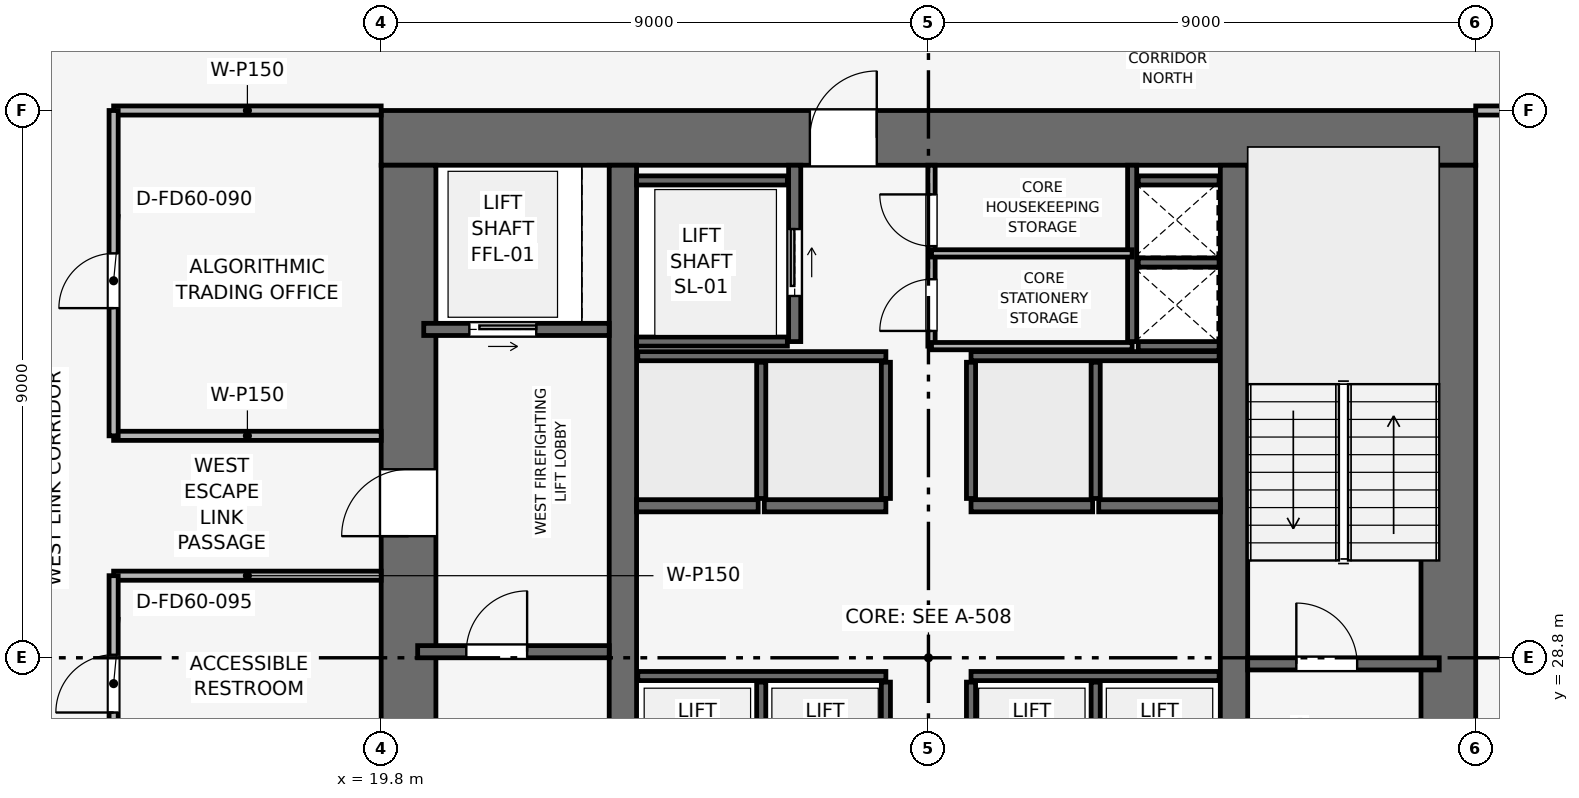
"""IFC4 building model, lengths in metres.
Left out: names, types, materials, properties, quantities, classifications, styles, units other than length and angle.
Written with IfcOpenShell. Run it as: python <this file> out.ifc"""

import sys

from ifc_helpers import new_model, si_unit, direction, frame, frame_2d, origin, place, context, subcontext, project, spatial, rectangle, extrude, element, fill, save


model = new_model("IFC4")
c1 = context("Model", 3, precision=1e-05, world=origin(), true_north=direction((0.0, 1.0)))
c2 = subcontext(c1, "Body", "Model", "MODEL_VIEW")
j1 = project(units=[si_unit("LENGTHUNIT", "METRE"), si_unit("PLANEANGLEUNIT", "RADIAN")], contexts=[c1])
p1 = place(None, origin())
s1 = spatial("IfcSite", under=j1, at=p1, CompositionType="ELEMENT")
p2 = place(p1, origin())
s2 = spatial("IfcBuilding", under=s1, at=p2, CompositionType="ELEMENT")
p3 = place(p2, frame((0.0, 0.0, 175.8)))
s3 = spatial("IfcBuildingStorey", under=s2, at=p3, CompositionType="ELEMENT", Elevation=175.8)
p4 = place(p3, frame((19.8, 37.35, 0.0), z_axis=(0.0, 0.0, 1.0), x_axis=(1.0, 0.0, 0.0)))
e1 = element("IfcWall", 1, at=p4, inside=s3, PredefinedType="SHEAR", context=c2, shape_type="SweptSolid", body=[
    extrude(rectangle(XDim=18.0, YDim=0.9, at=frame_2d((9.0, 0.0))), origin(), (0.0, 0.0, 1.0), 3.75),
])
p5 = place(p4, frame((7.05, 0.0, 0.0)))
e2 = element("IfcOpeningElement", 2, at=p5, cuts=e1, PredefinedType="OPENING", context=c2, shape_type="SweptSolid", body=[
    extrude(rectangle(XDim=1.1, YDim=2.15, at=frame_2d((0.55, 1.075))), frame((0.0, 0.46, 0.0), z_axis=(0.0, -1.0, 0.0), x_axis=(1.0, 0.0, 0.0)), (0.0, 0.0, 1.0), 0.92),
])
p6 = place(p3, frame((20.25, 20.7, 0.0), z_axis=(0.0, 0.0, 1.0), x_axis=(0.0, 1.0, 0.0)))
e3 = element("IfcWall", 3, at=p6, inside=s3, PredefinedType="SHEAR", context=c2, shape_type="SweptSolid", body=[
    extrude(rectangle(XDim=16.2, YDim=0.9, at=frame_2d((8.1, 0.0))), origin(), (0.0, 0.0, 1.0), 3.75),
])
p7 = place(p6, frame((10.1, 0.0, 0.0)))
e4 = element("IfcOpeningElement", 4, at=p7, cuts=e3, PredefinedType="OPENING", context=c2, shape_type="SweptSolid", body=[
    extrude(rectangle(XDim=1.1, YDim=2.15, at=frame_2d((0.55, 1.075))), frame((0.0, 0.46, 0.0), z_axis=(0.0, -1.0, 0.0), x_axis=(1.0, 0.0, 0.0)), (0.0, 0.0, 1.0), 0.92),
])
p8 = place(p3, frame((37.35, 20.7, 0.0), z_axis=(0.0, 0.0, 1.0), x_axis=(0.0, 1.0, 0.0)))
e5 = element("IfcWall", 5, at=p8, inside=s3, PredefinedType="SHEAR", context=c2, shape_type="SweptSolid", body=[
    extrude(rectangle(XDim=16.2, YDim=0.9, at=frame_2d((8.1, 0.0))), origin(), (0.0, 0.0, 1.0), 3.75),
])
p9 = place(p8, frame((4.6, 0.0, 0.0)))
e6 = element("IfcOpeningElement", 6, at=p9, cuts=e5, PredefinedType="OPENING", context=c2, shape_type="SweptSolid", body=[
    extrude(rectangle(XDim=1.1, YDim=2.15, at=frame_2d((0.55, 1.075))), frame((0.0, 0.46, 0.0), z_axis=(0.0, -1.0, 0.0), x_axis=(1.0, 0.0, 0.0)), (0.0, 0.0, 1.0), 0.92),
])
for number, where, z_axis, x_axis in (
    (7, (23.775, 20.7, 0.0), (0.0, 0.0, 1.0), (0.0, 1.0, 0.0)),
    (8, (33.825, 20.7, 0.0), (0.0, 0.0, 1.0), (0.0, 1.0, 0.0)),
):
    element("IfcWall", number, at=place(p3, frame(where, z_axis=z_axis, x_axis=x_axis)), inside=s3, PredefinedType="SHEAR", context=c2, shape_type="SweptSolid", body=[
        extrude(rectangle(XDim=16.2, YDim=0.45, at=frame_2d((8.1, 0.0))), origin(), (0.0, 0.0, 1.0), 3.75),
    ])
p10 = place(p3, frame((20.4, 28.9, 0.0), z_axis=(0.0, 0.0, 1.0), x_axis=(1.0, 0.0, 0.0)))
e9 = element("IfcWall", 9, at=p10, inside=s3, PredefinedType="SHEAR", context=c2, shape_type="SweptSolid", body=[
    extrude(rectangle(XDim=3.15, YDim=0.2, at=frame_2d((1.575, 0.0))), origin(), (0.0, 0.0, 1.0), 3.495),
])
p11 = place(p10, frame((0.8, 0.0, 0.0)))
e10 = element("IfcOpeningElement", 10, at=p11, cuts=e9, PredefinedType="OPENING", context=c2, shape_type="SweptSolid", body=[
    extrude(rectangle(XDim=1.0, YDim=2.1, at=frame_2d((0.5, 1.05))), frame((0.0, 0.11, 0.0), z_axis=(0.0, -1.0, 0.0), x_axis=(1.0, 0.0, 0.0)), (0.0, 0.0, 1.0), 0.22),
])
p12 = place(p3, frame((34.05, 28.7, 0.0), z_axis=(0.0, 0.0, 1.0), x_axis=(1.0, 0.0, 0.0)))
e11 = element("IfcWall", 11, at=p12, inside=s3, PredefinedType="SHEAR", context=c2, shape_type="SweptSolid", body=[
    extrude(rectangle(XDim=3.15, YDim=0.2, at=frame_2d((1.575, 0.0))), origin(), (0.0, 0.0, 1.0), 3.495),
])
p13 = place(p12, frame((0.8, 0.0, 0.0)))
e12 = element("IfcOpeningElement", 12, at=p13, cuts=e11, PredefinedType="OPENING", context=c2, shape_type="SweptSolid", body=[
    extrude(rectangle(XDim=1.0, YDim=2.1, at=frame_2d((0.5, 1.05))), frame((0.0, 0.11, 0.0), z_axis=(0.0, -1.0, 0.0), x_axis=(1.0, 0.0, 0.0)), (0.0, 0.0, 1.0), 0.22),
])
p14 = place(p3, frame((32.15, 34.0, 0.0), z_axis=(0.0, 0.0, 1.0), x_axis=(0.0, 1.0, 0.0)))
e13 = element("IfcWall", 13, at=p14, inside=s3, PredefinedType="SHEAR", context=c2, shape_type="SweptSolid", body=[
    extrude(rectangle(XDim=2.9, YDim=0.15, at=frame_2d((1.45, 0.0))), origin(), (0.0, 0.0, 1.0), 3.495),
])
for number, where, z_axis, x_axis in (
    (14, (32.25, 33.925, 0.0), (0.0, 0.0, 1.0), (1.0, 0.0, 0.0)),
    (15, (32.25, 35.3, 0.0), (0.0, 0.0, 1.0), (1.0, 0.0, 0.0)),
):
    element("IfcWall", number, at=place(p3, frame(where, z_axis=z_axis, x_axis=x_axis)), inside=s3, PredefinedType="SHEAR", context=c2, shape_type="SweptSolid", body=[
        extrude(rectangle(XDim=1.33, YDim=0.15, at=frame_2d((0.665, 0.0))), origin(), (0.0, 0.0, 1.0), 3.495),
    ])
p15 = place(p3, frame((20.5, 34.2, 0.0), z_axis=(0.0, 0.0, 1.0), x_axis=(1.0, 0.0, 0.0)))
e16 = element("IfcWall", 16, at=p15, inside=s3, PredefinedType="SHEAR", context=c2, shape_type="SweptSolid", body=[
    extrude(rectangle(XDim=3.05, YDim=0.2, at=frame_2d((1.525, 0.0))), origin(), (0.0, 0.0, 1.0), 3.495),
])
p16 = place(p15, frame((0.75, 0.0, 0.0)))
e17 = element("IfcOpeningElement", 17, at=p16, cuts=e16, PredefinedType="OPENING", context=c2, shape_type="SweptSolid", body=[
    extrude(rectangle(XDim=1.1, YDim=2.15, at=frame_2d((0.55, 1.075))), frame((0.0, 0.11, 0.0), z_axis=(0.0, -1.0, 0.0), x_axis=(1.0, 0.0, 0.0)), (0.0, 0.0, 1.0), 0.22),
])
p17 = place(p3, frame((26.6, 34.0, 0.0), z_axis=(0.0, 0.0, 1.0), x_axis=(0.0, 1.0, 0.0)))
e18 = element("IfcWall", 18, at=p17, inside=s3, PredefinedType="SHEAR", context=c2, shape_type="SweptSolid", body=[
    extrude(rectangle(XDim=2.9, YDim=0.2, at=frame_2d((1.45, 0.0))), origin(), (0.0, 0.0, 1.0), 3.495),
])
p18 = place(p17, frame((0.75, 0.0, 0.0)))
e19 = element("IfcOpeningElement", 19, at=p18, cuts=e18, PredefinedType="OPENING", context=c2, shape_type="SweptSolid", body=[
    extrude(rectangle(XDim=1.1, YDim=2.15, at=frame_2d((0.55, 1.075))), frame((0.0, 0.11, 0.0), z_axis=(0.0, -1.0, 0.0), x_axis=(1.0, 0.0, 0.0)), (0.0, 0.0, 1.0), 0.22),
])
for number, where, z_axis, x_axis in (
    (20, (24.0, 34.0, 0.0), (0.0, 0.0, 1.0), (1.0, 0.0, 0.0)),
    (21, (24.0, 36.65, 0.0), (0.0, 0.0, 1.0), (1.0, 0.0, 0.0)),
):
    element("IfcWall", number, at=place(p3, frame(where, z_axis=z_axis, x_axis=x_axis)), inside=s3, PredefinedType="SHEAR", context=c2, shape_type="SweptSolid", body=[
        extrude(rectangle(XDim=2.48, YDim=0.15, at=frame_2d((1.24, 0.0))), origin(), (0.0, 0.0, 1.0), 3.495),
    ])
for number, where, z_axis, x_axis in (
    (22, (24.0, 31.3, 0.0), (0.0, 0.0, 1.0), (1.0, 0.0, 0.0)),
    (23, (26.1, 31.3, 0.0), (0.0, 0.0, 1.0), (1.0, 0.0, 0.0)),
    (24, (29.5, 31.3, 0.0), (0.0, 0.0, 1.0), (1.0, 0.0, 0.0)),
    (25, (31.6, 31.3, 0.0), (0.0, 0.0, 1.0), (1.0, 0.0, 0.0)),
):
    element("IfcWall", number, at=place(p3, frame(where, z_axis=z_axis, x_axis=x_axis)), inside=s3, PredefinedType="SHEAR", context=c2, shape_type="SweptSolid", body=[
        extrude(rectangle(XDim=2.0, YDim=0.2, at=frame_2d((1.0, 0.0))), origin(), (0.0, 0.0, 1.0), 3.495),
    ])
p19 = place(p3, frame((32.25, 36.65, 0.0), z_axis=(0.0, 0.0, 1.0), x_axis=(1.0, 0.0, 0.0)))
e26 = element("IfcWall", 26, at=p19, inside=s3, PredefinedType="SHEAR", context=c2, shape_type="SweptSolid", body=[
    extrude(rectangle(XDim=1.33, YDim=0.15, at=frame_2d((0.665, 0.0))), origin(), (0.0, 0.0, 1.0), 3.495),
])
for number, where, z_axis, x_axis in (
    (27, (24.02, 28.5, 0.0), (0.0, 0.0, 1.0), (1.0, 0.0, 0.0)),
    (28, (29.5, 28.5, 0.0), (0.0, 0.0, 1.0), (1.0, 0.0, 0.0)),
):
    element("IfcWall", number, at=place(p3, frame(where, z_axis=z_axis, x_axis=x_axis)), inside=s3, PredefinedType="SHEAR", context=c2, shape_type="SweptSolid", body=[
        extrude(rectangle(XDim=4.08, YDim=0.15, at=frame_2d((2.04, 0.0))), origin(), (0.0, 0.0, 1.0), 3.495),
    ])
for number, where, z_axis, x_axis in (
    (29, (26.05, 26.12, 0.0), (0.0, 0.0, 1.0), (0.0, 1.0, 0.0)),
    (30, (28.1, 26.12, 0.0), (0.0, 0.0, 1.0), (0.0, 1.0, 0.0)),
    (31, (29.5, 26.12, 0.0), (0.0, 0.0, 1.0), (0.0, 1.0, 0.0)),
    (32, (31.55, 26.12, 0.0), (0.0, 0.0, 1.0), (0.0, 1.0, 0.0)),
):
    element("IfcWall", number, at=place(p3, frame(where, z_axis=z_axis, x_axis=x_axis)), inside=s3, PredefinedType="SHEAR", context=c2, shape_type="SweptSolid", body=[
        extrude(rectangle(XDim=2.28, YDim=0.15, at=frame_2d((1.14, 0.0))), origin(), (0.0, 0.0, 1.0), 3.495),
    ])
for number, where, z_axis, x_axis in (
    (33, (24.02, 33.76, 0.0), (0.0, 0.0, 1.0), (1.0, 0.0, 0.0)),
    (34, (29.5, 33.76, 0.0), (0.0, 0.0, 1.0), (1.0, 0.0, 0.0)),
):
    element("IfcWall", number, at=place(p3, frame(where, z_axis=z_axis, x_axis=x_axis)), inside=s3, PredefinedType="SHEAR", context=c2, shape_type="SweptSolid", body=[
        extrude(rectangle(XDim=4.08, YDim=0.15, at=frame_2d((2.04, 0.0))), origin(), (0.0, 0.0, 1.0), 3.495),
    ])
for number, where, z_axis, x_axis in (
    (35, (26.05, 31.42, 0.0), (0.0, 0.0, 1.0), (0.0, 1.0, 0.0)),
    (36, (28.1, 31.42, 0.0), (0.0, 0.0, 1.0), (0.0, 1.0, 0.0)),
    (37, (29.5, 31.42, 0.0), (0.0, 0.0, 1.0), (0.0, 1.0, 0.0)),
    (38, (31.55, 31.42, 0.0), (0.0, 0.0, 1.0), (0.0, 1.0, 0.0)),
):
    element("IfcWall", number, at=place(p3, frame(where, z_axis=z_axis, x_axis=x_axis)), inside=s3, PredefinedType="SHEAR", context=c2, shape_type="SweptSolid", body=[
        extrude(rectangle(XDim=2.24, YDim=0.15, at=frame_2d((1.12, 0.0))), origin(), (0.0, 0.0, 1.0), 3.495),
    ])
p20 = place(p3, frame((28.85, 33.925, 0.0), z_axis=(0.0, 0.0, 1.0), x_axis=(0.0, 1.0, 0.0)))
e39 = element("IfcWall", 39, at=p20, inside=s3, PredefinedType="PARTITIONING", context=c2, shape_type="SweptSolid", body=[
    extrude(rectangle(XDim=2.975, YDim=0.12, at=frame_2d((1.487, 0.0))), origin(), (0.0, 0.0, 1.0), 3.495),
])
p21 = place(p20, frame((0.25, 0.0, 0.0)))
e40 = element("IfcOpeningElement", 40, at=p21, cuts=e39, PredefinedType="OPENING", context=c2, shape_type="SweptSolid", body=[
    extrude(rectangle(XDim=0.85, YDim=2.1, at=frame_2d((0.425, 1.05))), frame((0.0, 0.07, 0.0), z_axis=(0.0, -1.0, 0.0), x_axis=(1.0, 0.0, 0.0)), (0.0, 0.0, 1.0), 0.14),
])
p22 = place(p20, frame((1.645, 0.0, 0.0)))
e41 = element("IfcOpeningElement", 41, at=p22, cuts=e39, PredefinedType="OPENING", context=c2, shape_type="SweptSolid", body=[
    extrude(rectangle(XDim=0.85, YDim=2.1, at=frame_2d((0.425, 1.05))), frame((0.0, 0.07, 0.0), z_axis=(0.0, -1.0, 0.0), x_axis=(1.0, 0.0, 0.0)), (0.0, 0.0, 1.0), 0.14),
])
for number, where, z_axis, x_axis in (
    (42, (28.85, 35.45, 0.0), (0.0, 0.0, 1.0), (1.0, 0.0, 0.0)),
    (43, (28.85, 33.925, 0.0), (0.0, 0.0, 1.0), (1.0, 0.0, 0.0)),
):
    element("IfcWall", number, at=place(p3, frame(where, z_axis=z_axis, x_axis=x_axis)), inside=s3, PredefinedType="PARTITIONING", context=c2, shape_type="SweptSolid", body=[
        extrude(rectangle(XDim=3.3, YDim=0.12, at=frame_2d((1.65, 0.0))), origin(), (0.0, 0.0, 1.0), 3.495),
    ])
for number, where, z_axis, x_axis in (
    (44, (15.4, 30.15, 0.0), (0.0, 0.0, 1.0), (1.0, 0.0, 0.0)),
    (45, (15.4, 32.45, 0.0), (0.0, 0.0, 1.0), (1.0, 0.0, 0.0)),
):
    element("IfcWall", number, at=place(p3, frame(where, z_axis=z_axis, x_axis=x_axis)), inside=s3, PredefinedType="PARTITIONING", context=c2, shape_type="SweptSolid", body=[
        extrude(rectangle(XDim=4.4, YDim=0.15, at=frame_2d((2.2, 0.0))), origin(), (0.0, 0.0, 1.0), 3.495),
    ])
p23 = place(p3, frame((15.4, 37.8, 0.0), z_axis=(0.0, 0.0, 1.0), x_axis=(1.0, 0.0, 0.0)))
e46 = element("IfcWall", 46, at=p23, inside=s3, PredefinedType="PARTITIONING", context=c2, shape_type="SweptSolid", body=[
    extrude(rectangle(XDim=4.4, YDim=0.15, at=frame_2d((2.2, 0.0))), origin(), (0.0, 0.0, 1.0), 3.03),
])
p24 = place(p3, frame((15.4, 19.8, 0.0), z_axis=(0.0, 0.0, 1.0), x_axis=(0.0, 1.0, 0.0)))
e47 = element("IfcWall", 47, at=p24, inside=s3, PredefinedType="PARTITIONING", context=c2, shape_type="SweptSolid", body=[
    extrude(rectangle(XDim=10.35, YDim=0.15, at=frame_2d((5.175, 0.0))), origin(), (0.0, 0.0, 1.0), 3.03),
])
p25 = place(p24, frame((1.2, 0.0, 0.0)))
e48 = element("IfcOpeningElement", 48, at=p25, cuts=e47, PredefinedType="OPENING", context=c2, shape_type="SweptSolid", body=[
    extrude(rectangle(XDim=0.9, YDim=2.1, at=frame_2d((0.45, 1.05))), frame((0.0, 0.085, 0.0), z_axis=(0.0, -1.0, 0.0), x_axis=(1.0, 0.0, 0.0)), (0.0, 0.0, 1.0), 0.17),
])
p26 = place(p24, frame((4.7, 0.0, 0.0)))
e49 = element("IfcOpeningElement", 49, at=p26, cuts=e47, PredefinedType="OPENING", context=c2, shape_type="SweptSolid", body=[
    extrude(rectangle(XDim=0.9, YDim=2.1, at=frame_2d((0.45, 1.05))), frame((0.0, 0.085, 0.0), z_axis=(0.0, -1.0, 0.0), x_axis=(1.0, 0.0, 0.0)), (0.0, 0.0, 1.0), 0.17),
])
p27 = place(p24, frame((8.1, 0.0, 0.0)))
e50 = element("IfcOpeningElement", 50, at=p27, cuts=e47, PredefinedType="OPENING", context=c2, shape_type="SweptSolid", body=[
    extrude(rectangle(XDim=0.95, YDim=2.1, at=frame_2d((0.475, 1.05))), frame((0.0, 0.085, 0.0), z_axis=(0.0, -1.0, 0.0), x_axis=(1.0, 0.0, 0.0)), (0.0, 0.0, 1.0), 0.17),
])
p28 = place(p3, frame((15.4, 32.45, 0.0), z_axis=(0.0, 0.0, 1.0), x_axis=(0.0, 1.0, 0.0)))
e51 = element("IfcWall", 51, at=p28, inside=s3, PredefinedType="PARTITIONING", context=c2, shape_type="SweptSolid", body=[
    extrude(rectangle(XDim=5.35, YDim=0.15, at=frame_2d((2.675, 0.0))), origin(), (0.0, 0.0, 1.0), 3.03),
])
p29 = place(p28, frame((2.1, 0.0, 0.0)))
e52 = element("IfcOpeningElement", 52, at=p29, cuts=e51, PredefinedType="OPENING", context=c2, shape_type="SweptSolid", body=[
    extrude(rectangle(XDim=0.9, YDim=2.1, at=frame_2d((0.45, 1.05))), frame((0.0, 0.085, 0.0), z_axis=(0.0, -1.0, 0.0), x_axis=(1.0, 0.0, 0.0)), (0.0, 0.0, 1.0), 0.17),
])
p30 = place(p3, frame((37.8, 37.8, 0.0), z_axis=(0.0, 0.0, 1.0), x_axis=(1.0, 0.0, 0.0)))
e53 = element("IfcWall", 53, at=p30, inside=s3, PredefinedType="PARTITIONING", context=c2, shape_type="SweptSolid", body=[
    extrude(rectangle(XDim=15.17, YDim=0.15, at=frame_2d((7.585, 0.0))), origin(), (0.0, 0.0, 1.0), 2.98),
])
p31 = place(p30, frame((3.4, 0.0, 0.0)))
e54 = element("IfcOpeningElement", 54, at=p31, cuts=e53, PredefinedType="OPENING", context=c2, shape_type="SweptSolid", body=[
    extrude(rectangle(XDim=0.9, YDim=2.1, at=frame_2d((0.45, 1.05))), frame((0.0, 0.085, 0.0), z_axis=(0.0, -1.0, 0.0), x_axis=(1.0, 0.0, 0.0)), (0.0, 0.0, 1.0), 0.17),
])
p32 = place(p11, origin())
e55 = element("IfcDoor", 55, at=p32, inside=s3, OperationType="SINGLE_SWING_RIGHT", PredefinedType="DOOR", context=c2, shape_type="SweptSolid", body=[
    extrude(rectangle(XDim=1.0, YDim=2.1, at=frame_2d((0.5, 1.05))), frame((0.0, 0.025, 0.0), z_axis=(0.0, -1.0, 0.0), x_axis=(1.0, 0.0, 0.0)), (0.0, 0.0, 1.0), 0.05),
])
fill(e10, e55)
p33 = place(p13, origin())
e56 = element("IfcDoor", 56, at=p33, inside=s3, OperationType="SINGLE_SWING_LEFT", PredefinedType="DOOR", context=c2, shape_type="SweptSolid", body=[
    extrude(rectangle(XDim=1.0, YDim=2.1, at=frame_2d((0.5, 1.05))), frame((0.0, 0.025, 0.0), z_axis=(0.0, -1.0, 0.0), x_axis=(1.0, 0.0, 0.0)), (0.0, 0.0, 1.0), 0.05),
])
fill(e12, e56)
p34 = place(p16, origin())
e57 = element("IfcDoor", 57, at=p34, inside=s3, OperationType="SLIDING_TO_RIGHT", PredefinedType="DOOR", context=c2, shape_type="SweptSolid", body=[
    extrude(rectangle(XDim=1.1, YDim=2.15, at=frame_2d((0.55, 1.075))), frame((0.0, 0.025, 0.0), z_axis=(0.0, -1.0, 0.0), x_axis=(1.0, 0.0, 0.0)), (0.0, 0.0, 1.0), 0.05),
])
fill(e17, e57)
p35 = place(p18, origin())
e58 = element("IfcDoor", 58, at=p35, inside=s3, OperationType="SLIDING_TO_RIGHT", PredefinedType="DOOR", context=c2, shape_type="SweptSolid", body=[
    extrude(rectangle(XDim=1.1, YDim=2.15, at=frame_2d((0.55, 1.075))), frame((0.0, 0.025, 0.0), z_axis=(0.0, -1.0, 0.0), x_axis=(1.0, 0.0, 0.0)), (0.0, 0.0, 1.0), 0.05),
])
fill(e19, e58)
p36 = place(p21, origin())
e59 = element("IfcDoor", 59, at=p36, inside=s3, OperationType="SINGLE_SWING_LEFT", PredefinedType="DOOR", context=c2, shape_type="SweptSolid", body=[
    extrude(rectangle(XDim=0.85, YDim=2.1, at=frame_2d((0.425, 1.05))), frame((0.0, 0.025, 0.0), z_axis=(0.0, -1.0, 0.0), x_axis=(1.0, 0.0, 0.0)), (0.0, 0.0, 1.0), 0.05),
])
fill(e40, e59)
p37 = place(p22, origin())
e60 = element("IfcDoor", 60, at=p37, inside=s3, OperationType="SINGLE_SWING_RIGHT", PredefinedType="DOOR", context=c2, shape_type="SweptSolid", body=[
    extrude(rectangle(XDim=0.85, YDim=2.1, at=frame_2d((0.425, 1.05))), frame((0.0, 0.025, 0.0), z_axis=(0.0, -1.0, 0.0), x_axis=(1.0, 0.0, 0.0)), (0.0, 0.0, 1.0), 0.05),
])
fill(e41, e60)
p38 = place(p27, origin())
e61 = element("IfcDoor", 61, at=p38, inside=s3, OperationType="SINGLE_SWING_LEFT", PredefinedType="DOOR", context=c2, shape_type="SweptSolid", body=[
    extrude(rectangle(XDim=0.95, YDim=2.1, at=frame_2d((0.475, 1.05))), frame((0.0, 0.025, 0.0), z_axis=(0.0, -1.0, 0.0), x_axis=(1.0, 0.0, 0.0)), (0.0, 0.0, 1.0), 0.05),
])
fill(e50, e61)
p39 = place(p29, origin())
e62 = element("IfcDoor", 62, at=p39, inside=s3, OperationType="SINGLE_SWING_LEFT", PredefinedType="DOOR", context=c2, shape_type="SweptSolid", body=[
    extrude(rectangle(XDim=0.9, YDim=2.1, at=frame_2d((0.45, 1.05))), frame((0.0, 0.025, 0.0), z_axis=(0.0, -1.0, 0.0), x_axis=(1.0, 0.0, 0.0)), (0.0, 0.0, 1.0), 0.05),
])
fill(e52, e62)
p40 = place(p7, origin())
e63 = element("IfcDoor", 63, at=p40, inside=s3, OperationType="SINGLE_SWING_LEFT", PredefinedType="DOOR", context=c2, shape_type="SweptSolid", body=[
    extrude(rectangle(XDim=1.1, YDim=2.15, at=frame_2d((0.55, 1.075))), frame((0.0, 0.025, 0.0), z_axis=(0.0, -1.0, 0.0), x_axis=(1.0, 0.0, 0.0)), (0.0, 0.0, 1.0), 0.05),
])
fill(e4, e63)
p41 = place(p5, origin())
e64 = element("IfcDoor", 64, at=p41, inside=s3, OperationType="SINGLE_SWING_RIGHT", PredefinedType="DOOR", context=c2, shape_type="SweptSolid", body=[
    extrude(rectangle(XDim=1.1, YDim=2.15, at=frame_2d((0.55, 1.075))), frame((0.0, 0.025, 0.0), z_axis=(0.0, -1.0, 0.0), x_axis=(1.0, 0.0, 0.0)), (0.0, 0.0, 1.0), 0.05),
])
fill(e2, e64)
save(model, sys.argv[1])
